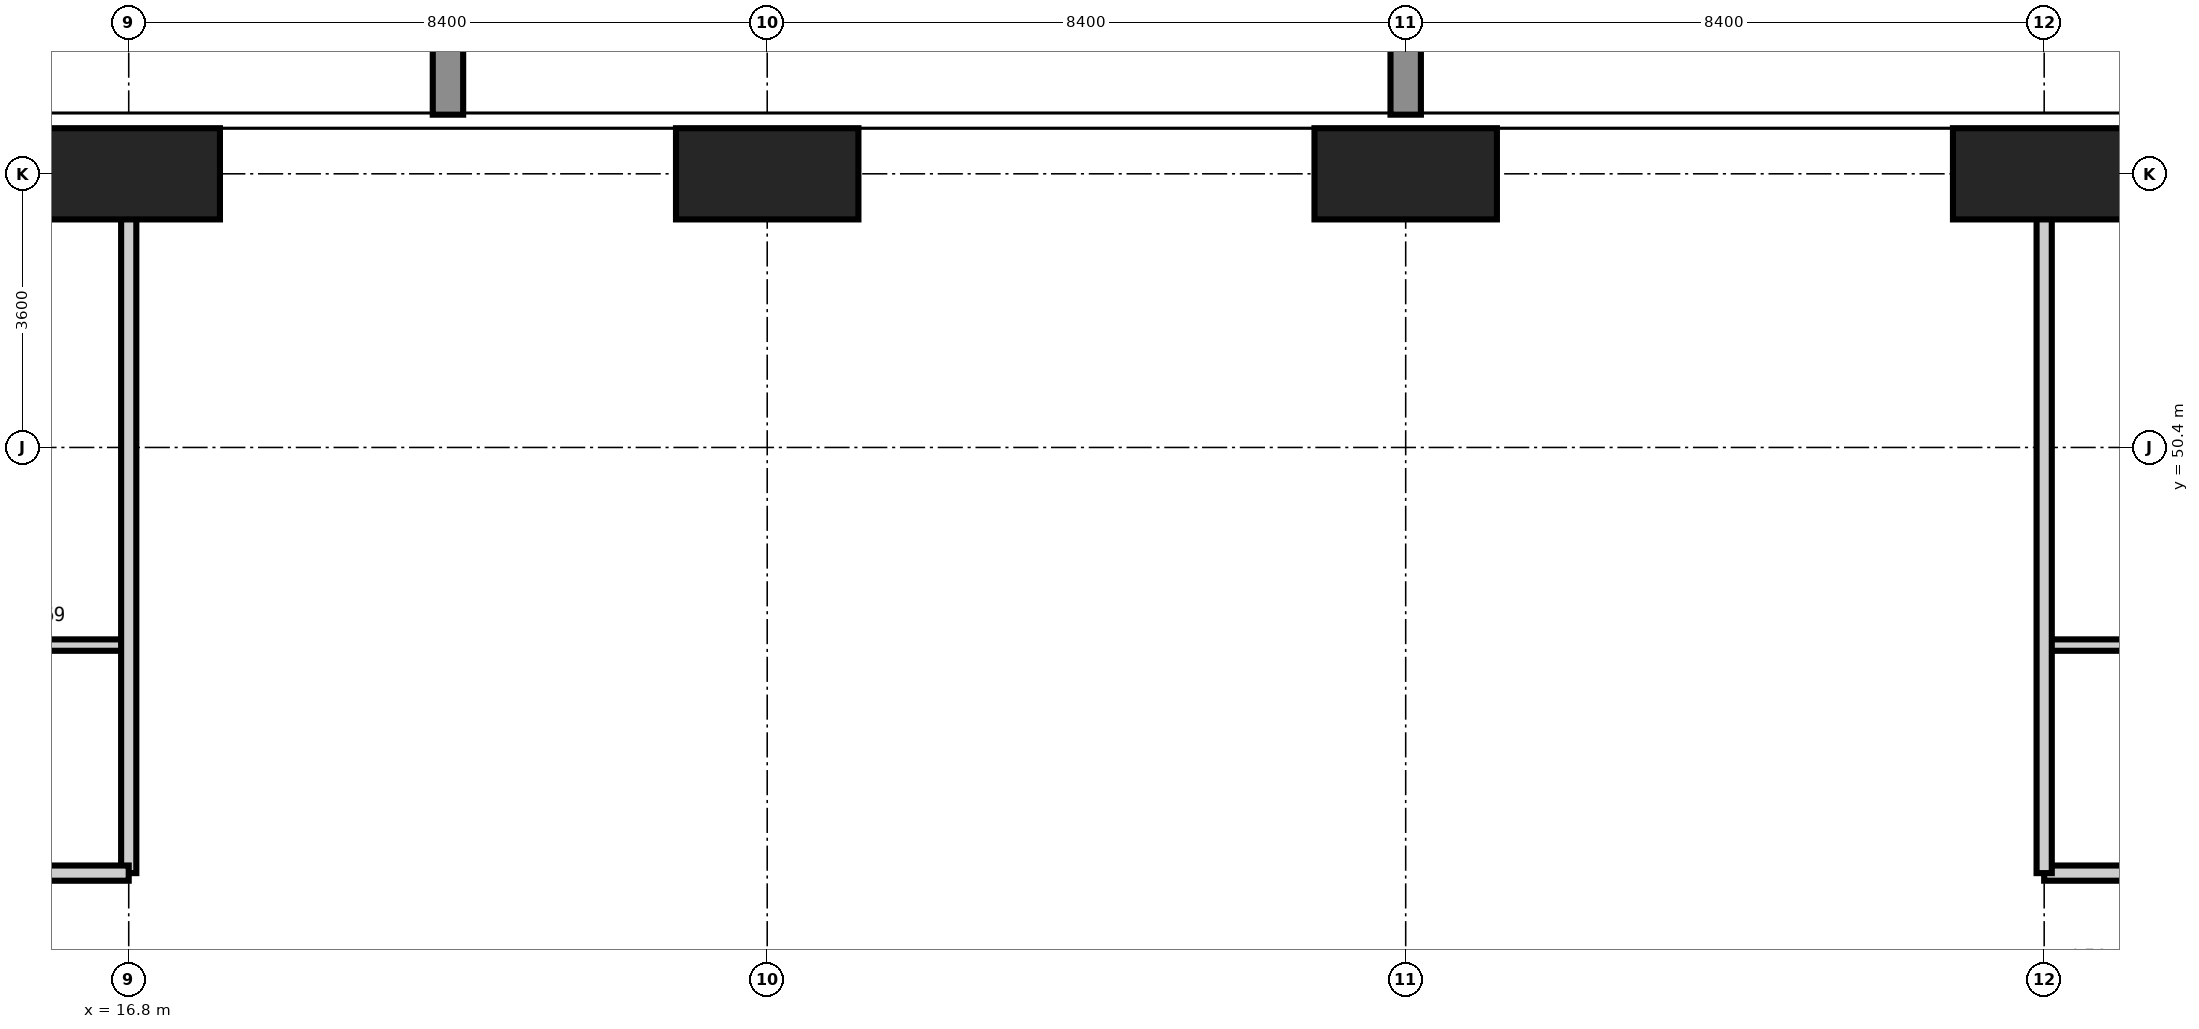
"""IFC4 building model, lengths in metres.
Left out: names, types, materials, properties, quantities, classifications, styles, units other than length and angle.
Written with IfcOpenShell. Run it as: python <this file> out.ifc"""

import sys

from ifc_helpers import new_model, si_unit, direction, frame, frame_2d, origin, origin_2d, place, context, subcontext, project, spatial, rectangle, extrude, element, save


model = new_model("IFC4")
c1 = context("Model", 3, precision=1e-05, world=origin(), true_north=direction((0.0, 1.0)))
c2 = subcontext(c1, "Body", "Model", "MODEL_VIEW")
j1 = project(units=[si_unit("LENGTHUNIT", "METRE"), si_unit("PLANEANGLEUNIT", "RADIAN")], contexts=[c1])
p1 = place(None, origin())
s1 = spatial("IfcSite", under=j1, at=p1, CompositionType="ELEMENT")
p2 = place(p1, origin())
s2 = spatial("IfcBuilding", under=s1, at=p2, CompositionType="ELEMENT")
p3 = place(p2, frame((0.0, 0.0, 198.6)))
s3 = spatial("IfcBuildingStorey", under=s2, at=p3, CompositionType="ELEMENT", Elevation=198.6)
for number, where, z_axis, x_axis in (
    (1, (16.8, 54.0, -0.35), (0.0, 0.0, 1.0), (1.0, 0.0, 0.0)),
    (2, (25.2, 54.0, -0.35), (0.0, 0.0, 1.0), (1.0, 0.0, 0.0)),
    (3, (33.6, 54.0, -0.35), (0.0, 0.0, 1.0), (1.0, 0.0, 0.0)),
    (4, (42.0, 54.0, -0.35), (0.0, 0.0, 1.0), (1.0, 0.0, 0.0)),
):
    element("IfcColumn", number, at=place(p3, frame(where, z_axis=z_axis, x_axis=x_axis)), inside=s3, PredefinedType="COLUMN", context=c2, shape_type="SweptSolid", body=[
        extrude(rectangle(XDim=2.4, YDim=1.2, at=origin_2d()), origin(), (0.0, 0.0, 1.0), 3.6),
    ])
p4 = place(p3, frame((13.4, 47.8, 0.0), z_axis=(0.0, 0.0, 1.0), x_axis=(1.0, 0.0, 0.0)))
e5 = element("IfcWall", 5, at=p4, inside=s3, PredefinedType="PARTITIONING", context=c2, shape_type="SweptSolid", body=[
    extrude(rectangle(XDim=3.4, YDim=0.15, at=frame_2d((1.7, 0.0))), origin(), (0.0, 0.0, 1.0), 3.25),
])
p5 = place(p4, frame((1.275, 0.0, 0.0)))
e6 = element("IfcOpeningElement", 6, at=p5, cuts=e5, PredefinedType="OPENING", context=c2, shape_type="SweptSolid", body=[
    extrude(rectangle(XDim=0.85, YDim=2.1, at=frame_2d((0.425, 1.05))), frame((0.0, 0.085, 0.0), z_axis=(0.0, -1.0, 0.0), x_axis=(1.0, 0.0, 0.0)), (0.0, 0.0, 1.0), 0.17),
])
p6 = place(p3, frame((42.0, 47.8, 0.0), z_axis=(0.0, 0.0, 1.0), x_axis=(1.0, 0.0, 0.0)))
e7 = element("IfcWall", 7, at=p6, inside=s3, PredefinedType="PARTITIONING", context=c2, shape_type="SweptSolid", body=[
    extrude(rectangle(XDim=2.2, YDim=0.15, at=frame_2d((1.1, 0.0))), origin(), (0.0, 0.0, 1.0), 3.25),
])
p7 = place(p3, frame((16.8, 44.8, 0.0), z_axis=(0.0, 0.0, 1.0), x_axis=(0.0, 1.0, 0.0)))
e8 = element("IfcWall", 8, at=p7, inside=s3, PredefinedType="PARTITIONING", context=c2, shape_type="SweptSolid", body=[
    extrude(rectangle(XDim=9.818, YDim=0.2, at=frame_2d((4.909, 0.0))), origin(), (0.0, 0.0, 1.0), 3.25),
])
p8 = place(p3, frame((13.4, 44.8, 0.0), z_axis=(0.0, 0.0, 1.0), x_axis=(1.0, 0.0, 0.0)))
e9 = element("IfcWall", 9, at=p8, inside=s3, PredefinedType="PARTITIONING", context=c2, shape_type="SweptSolid", body=[
    extrude(rectangle(XDim=3.4, YDim=0.2, at=frame_2d((1.7, 0.0))), origin(), (0.0, 0.0, 1.0), 3.25),
])
p9 = place(p3, frame((42.0, 44.8, 0.0), z_axis=(0.0, 0.0, 1.0), x_axis=(1.0, 0.0, 0.0)))
e10 = element("IfcWall", 10, at=p9, inside=s3, PredefinedType="PARTITIONING", context=c2, shape_type="SweptSolid", body=[
    extrude(rectangle(XDim=2.2, YDim=0.2, at=frame_2d((1.1, 0.0))), origin(), (0.0, 0.0, 1.0), 3.25),
])
p10 = place(p3, frame((42.0, 54.618, 0.0), z_axis=(0.0, 0.0, 1.0), x_axis=(0.0, -1.0, 0.0)))
e11 = element("IfcWall", 11, at=p10, inside=s3, PredefinedType="PARTITIONING", context=c2, shape_type="SweptSolid", body=[
    extrude(rectangle(XDim=9.818, YDim=0.2, at=frame_2d((4.909, 0.0))), origin(), (0.0, 0.0, 1.0), 3.25),
])
save(model, sys.argv[1])
